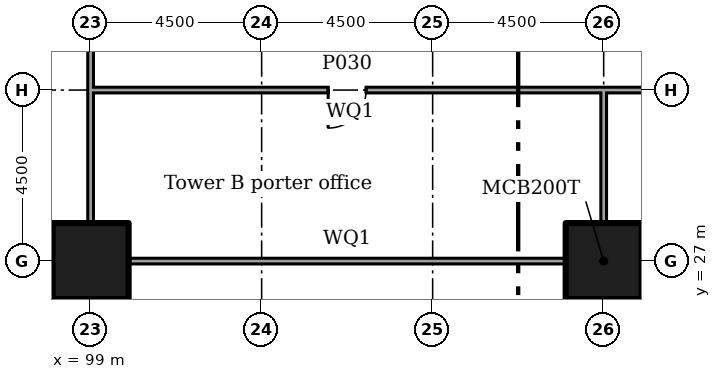
"""IFC4 building model, lengths in metres.
Left out: names, types, materials, properties, quantities, classifications, styles, units other than length and angle.
Written with IfcOpenShell. Run it as: python <this file> out.ifc"""

import sys

from ifc_helpers import new_model, si_unit, direction, frame, frame_2d, origin, origin_2d, place, context, subcontext, project, spatial, rectangle, extrude, element, fill, save


model = new_model("IFC4")
c1 = context("Model", 3, precision=1e-05, world=origin(), true_north=direction((0.0, 1.0)))
c2 = subcontext(c1, "Body", "Model", "MODEL_VIEW")
j1 = project(units=[si_unit("LENGTHUNIT", "METRE"), si_unit("PLANEANGLEUNIT", "RADIAN")], contexts=[c1])
p1 = place(None, origin())
s1 = spatial("IfcSite", under=j1, at=p1, CompositionType="ELEMENT")
p2 = place(p1, origin())
s2 = spatial("IfcBuilding", under=s1, at=p2, CompositionType="ELEMENT")
p3 = place(p2, origin())
s3 = spatial("IfcBuildingStorey", under=s2, at=p3, CompositionType="ELEMENT", Elevation=0.0)
for number, where in (
    (1, (99.0, 27.0, 0.0)),
    (2, (112.5, 27.0, 0.0)),
):
    element("IfcColumn", number, at=place(p3, frame(where)), inside=s3, PredefinedType="COLUMN", context=c2, shape_type="SweptSolid", body=[
        extrude(rectangle(XDim=2.0, YDim=2.0, at=origin_2d()), origin(), (0.0, 0.0, 1.0), 6.0),
    ])
p4 = place(p3, frame((99.0, 31.425, 0.0), z_axis=(0.0, 0.0, 1.0), x_axis=(0.0, 1.0, 0.0)))
e3 = element("IfcWall", 3, at=p4, inside=s3, PredefinedType="PARTITIONING", context=c2, shape_type="SweptSolid", body=[
    extrude(rectangle(XDim=4.055, YDim=0.15, at=frame_2d((2.027, 0.0))), origin(), (0.0, 0.0, 1.0), 5.55),
])
p5 = place(p4, frame((1.175, 0.0, 0.0)))
e4 = element("IfcOpeningElement", 4, at=p5, cuts=e3, PredefinedType="OPENING", context=c2, shape_type="SweptSolid", body=[
    extrude(rectangle(XDim=1.8, YDim=2.1, at=frame_2d((0.9, 1.05))), frame((0.0, 0.085, 0.0), z_axis=(0.0, -1.0, 0.0), x_axis=(1.0, 0.0, 0.0)), (0.0, 0.0, 1.0), 0.17),
])
p6 = place(p3, frame((99.0, 27.995, 0.0), z_axis=(0.0, 0.0, 1.0), x_axis=(0.0, 1.0, 0.0)))
e5 = element("IfcWall", 5, at=p6, inside=s3, PredefinedType="PARTITIONING", context=c2, shape_type="SweptSolid", body=[
    extrude(rectangle(XDim=3.505, YDim=0.15, at=frame_2d((1.752, 0.0))), origin(), (0.0, 0.0, 1.0), 5.55),
])
p7 = place(p3, frame((94.575, 27.0, 0.0)))
e6 = element("IfcWall", 6, at=p7, inside=s3, PredefinedType="PARTITIONING", context=c2, shape_type="SweptSolid", body=[
    extrude(rectangle(XDim=3.43, YDim=0.15, at=frame_2d((1.715, 0.0))), origin(), (0.0, 0.0, 1.0), 5.55),
])
p8 = place(p3, frame((99.075, 31.5, 0.0)))
e7 = element("IfcWall", 7, at=p8, inside=s3, PredefinedType="PARTITIONING", context=c2, shape_type="SweptSolid", body=[
    extrude(rectangle(XDim=13.5, YDim=0.15, at=frame_2d((6.75, 0.0))), origin(), (0.0, 0.0, 1.0), 5.55),
])
p9 = place(p8, frame((6.175, 0.0, 0.0)))
e8 = element("IfcOpeningElement", 8, at=p9, cuts=e7, PredefinedType="OPENING", context=c2, shape_type="SweptSolid", body=[
    extrude(rectangle(XDim=1.0, YDim=2.1, at=frame_2d((0.5, 1.05))), frame((0.0, 0.085, 0.0), z_axis=(0.0, -1.0, 0.0), x_axis=(1.0, 0.0, 0.0)), (0.0, 0.0, 1.0), 0.17),
])
p10 = place(p3, frame((112.5, 31.5, 0.0)))
e9 = element("IfcWall", 9, at=p10, inside=s3, PredefinedType="PARTITIONING", context=c2, shape_type="SweptSolid", body=[
    extrude(rectangle(XDim=3.98, YDim=0.15, at=frame_2d((1.99, 0.0))), origin(), (0.0, 0.0, 1.0), 5.55),
])
p11 = place(p10, frame((1.5, 0.0, 0.0)))
e10 = element("IfcOpeningElement", 10, at=p11, cuts=e9, PredefinedType="OPENING", context=c2, shape_type="SweptSolid", body=[
    extrude(rectangle(XDim=1.0, YDim=2.1, at=frame_2d((0.5, 1.05))), frame((0.0, 0.085, 0.0), z_axis=(0.0, -1.0, 0.0), x_axis=(1.0, 0.0, 0.0)), (0.0, 0.0, 1.0), 0.17),
])
p12 = place(p3, frame((112.5, 27.995, 0.0), z_axis=(0.0, 0.0, 1.0), x_axis=(0.0, 1.0, 0.0)))
e11 = element("IfcWall", 11, at=p12, inside=s3, PredefinedType="PARTITIONING", context=c2, shape_type="SweptSolid", body=[
    extrude(rectangle(XDim=3.43, YDim=0.15, at=frame_2d((1.715, 0.0))), origin(), (0.0, 0.0, 1.0), 5.55),
])
p13 = place(p3, frame((99.995, 27.0, 0.0)))
e12 = element("IfcWall", 12, at=p13, inside=s3, PredefinedType="PARTITIONING", context=c2, shape_type="SweptSolid", body=[
    extrude(rectangle(XDim=11.51, YDim=0.15, at=frame_2d((5.755, 0.0))), origin(), (0.0, 0.0, 1.0), 5.55),
])
p14 = place(p3, frame((113.495, 27.0, 0.0)))
e13 = element("IfcWall", 13, at=p14, inside=s3, PredefinedType="PARTITIONING", context=c2, shape_type="SweptSolid", body=[
    extrude(rectangle(XDim=7.01, YDim=0.15, at=frame_2d((3.505, 0.0))), origin(), (0.0, 0.0, 1.0), 5.55),
])
p15 = place(p3, frame((112.5, 18.075, 0.0), z_axis=(0.0, 0.0, 1.0), x_axis=(0.0, 1.0, 0.0)))
e14 = element("IfcWall", 14, at=p15, inside=s3, PredefinedType="PARTITIONING", context=c2, shape_type="SweptSolid", body=[
    extrude(rectangle(XDim=7.93, YDim=0.15, at=frame_2d((3.965, 0.0))), origin(), (0.0, 0.0, 1.0), 5.55),
])
p16 = place(p9, frame((1.0, 0.0, 0.0), x_axis=(-1.0, 0.0, 0.0)))
e15 = element("IfcDoor", 15, at=p16, inside=s3, OperationType="SINGLE_SWING_LEFT", PredefinedType="DOOR", context=c2, shape_type="SweptSolid", body=[
    extrude(rectangle(XDim=1.0, YDim=2.1, at=frame_2d((0.5, 1.05))), frame((0.0, 0.025, 0.0), z_axis=(0.0, -1.0, 0.0), x_axis=(1.0, 0.0, 0.0)), (0.0, 0.0, 1.0), 0.05),
])
fill(e8, e15)
save(model, sys.argv[1])
